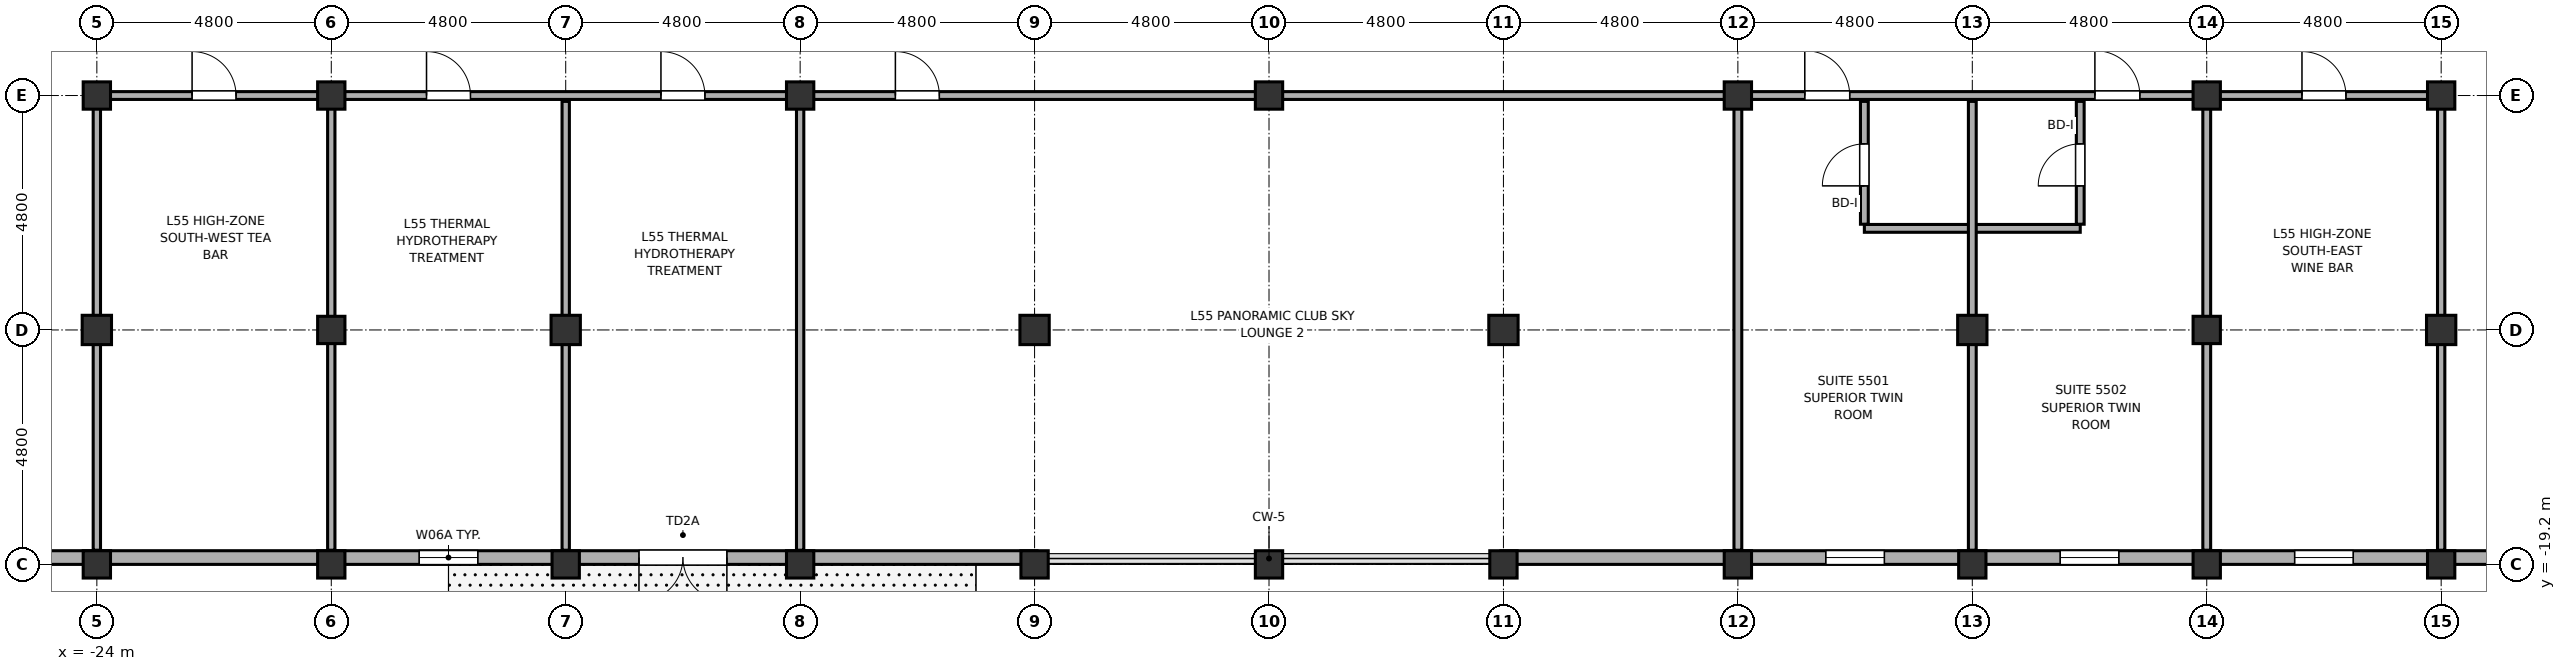
"""IFC4 building model, lengths in metres.
Left out: names, types, materials, properties, quantities, classifications, styles, units other than length and angle.
Written with IfcOpenShell. Run it as: python <this file> out.ifc"""

import sys

from ifc_helpers import new_model, si_unit, direction, frame, frame_2d, origin, origin_2d, place, context, subcontext, project, spatial, rectangle, hollow_rectangle, hollow_circle, extrude, element, fill, save


model = new_model("IFC4")
c1 = context("Model", 3, precision=1e-05, world=origin(), true_north=direction((0.0, 1.0)))
c2 = subcontext(c1, "Body", "Model", "MODEL_VIEW")
j1 = project(units=[si_unit("LENGTHUNIT", "METRE"), si_unit("PLANEANGLEUNIT", "RADIAN")], contexts=[c1])
p1 = place(None, origin())
s1 = spatial("IfcSite", under=j1, at=p1, CompositionType="ELEMENT")
p2 = place(p1, origin())
s2 = spatial("IfcBuilding", under=s1, at=p2, CompositionType="ELEMENT")
p3 = place(p2, frame((0.0, 0.0, 222.3)))
s3 = spatial("IfcBuildingStorey", under=s2, at=p3, CompositionType="ELEMENT", Elevation=222.3)
p4 = place(p3, frame((-24.0, -19.2, 0.0), z_axis=(0.0, 0.0, 1.0), x_axis=(1.0, 0.0, 0.0)))
e1 = element("IfcColumn", 1, at=p4, inside=s3, PredefinedType="COLUMN", context=c2, shape_type="SweptSolid", body=[
    extrude(hollow_circle(Radius=0.28, WallThickness=0.025, at=origin_2d()), origin(), (0.0, 0.0, 1.0), 3.85),
])
p5 = place(p3, frame((-24.0, -14.4, 0.0), z_axis=(0.0, 0.0, 1.0), x_axis=(1.0, 0.0, 0.0)))
e2 = element("IfcColumn", 2, at=p5, inside=s3, PredefinedType="COLUMN", context=c2, shape_type="SweptSolid", body=[
    extrude(hollow_rectangle(XDim=0.6, YDim=0.6, WallThickness=0.028, at=origin_2d()), origin(), (0.0, 0.0, 1.0), 3.85),
])
for number, where, z_axis, x_axis in (
    (3, (-24.0, -9.6, 0.0), (0.0, 0.0, 1.0), (1.0, 0.0, 0.0)),
    (4, (-19.2, -19.2, 0.0), (0.0, 0.0, 1.0), (1.0, 0.0, 0.0)),
    (5, (-19.2, -14.4, 0.0), (0.0, 0.0, 1.0), (1.0, 0.0, 0.0)),
    (6, (-19.2, -9.6, 0.0), (0.0, 0.0, 1.0), (1.0, 0.0, 0.0)),
    (7, (-14.4, -19.2, 0.0), (0.0, 0.0, 1.0), (1.0, 0.0, 0.0)),
):
    element("IfcColumn", number, at=place(p3, frame(where, z_axis=z_axis, x_axis=x_axis)), inside=s3, PredefinedType="COLUMN", context=c2, shape_type="SweptSolid", body=[
        extrude(hollow_circle(Radius=0.28, WallThickness=0.025, at=origin_2d()), origin(), (0.0, 0.0, 1.0), 3.85),
    ])
p6 = place(p3, frame((-14.4, -14.4, 0.0), z_axis=(0.0, 0.0, 1.0), x_axis=(1.0, 0.0, 0.0)))
e8 = element("IfcColumn", 8, at=p6, inside=s3, PredefinedType="COLUMN", context=c2, shape_type="SweptSolid", body=[
    extrude(hollow_rectangle(XDim=0.6, YDim=0.6, WallThickness=0.028, at=origin_2d()), origin(), (0.0, 0.0, 1.0), 3.85),
])
for number, where, z_axis, x_axis in (
    (9, (-9.6, -19.2, 0.0), (0.0, 0.0, 1.0), (1.0, 0.0, 0.0)),
    (10, (-9.6, -9.6, 0.0), (0.0, 0.0, 1.0), (1.0, 0.0, 0.0)),
    (11, (-4.8, -19.2, 0.0), (0.0, 0.0, 1.0), (1.0, 0.0, 0.0)),
):
    element("IfcColumn", number, at=place(p3, frame(where, z_axis=z_axis, x_axis=x_axis)), inside=s3, PredefinedType="COLUMN", context=c2, shape_type="SweptSolid", body=[
        extrude(hollow_circle(Radius=0.28, WallThickness=0.025, at=origin_2d()), origin(), (0.0, 0.0, 1.0), 3.85),
    ])
p7 = place(p3, frame((-4.8, -14.4, 0.0), z_axis=(0.0, 0.0, 1.0), x_axis=(1.0, 0.0, 0.0)))
e12 = element("IfcColumn", 12, at=p7, inside=s3, PredefinedType="COLUMN", context=c2, shape_type="SweptSolid", body=[
    extrude(hollow_rectangle(XDim=0.6, YDim=0.6, WallThickness=0.028, at=origin_2d()), origin(), (0.0, 0.0, 1.0), 3.85),
])
for number, where, z_axis, x_axis in (
    (13, (0.0, -19.2, 0.0), (0.0, 0.0, 1.0), (1.0, 0.0, 0.0)),
    (14, (0.0, -9.6, 0.0), (0.0, 0.0, 1.0), (1.0, 0.0, 0.0)),
    (15, (4.8, -19.2, 0.0), (0.0, 0.0, 1.0), (1.0, 0.0, 0.0)),
):
    element("IfcColumn", number, at=place(p3, frame(where, z_axis=z_axis, x_axis=x_axis)), inside=s3, PredefinedType="COLUMN", context=c2, shape_type="SweptSolid", body=[
        extrude(hollow_circle(Radius=0.28, WallThickness=0.025, at=origin_2d()), origin(), (0.0, 0.0, 1.0), 3.85),
    ])
p8 = place(p3, frame((4.8, -14.4, 0.0), z_axis=(0.0, 0.0, 1.0), x_axis=(1.0, 0.0, 0.0)))
e16 = element("IfcColumn", 16, at=p8, inside=s3, PredefinedType="COLUMN", context=c2, shape_type="SweptSolid", body=[
    extrude(hollow_rectangle(XDim=0.6, YDim=0.6, WallThickness=0.028, at=origin_2d()), origin(), (0.0, 0.0, 1.0), 3.85),
])
for number, where, z_axis, x_axis in (
    (17, (9.6, -19.2, 0.0), (0.0, 0.0, 1.0), (1.0, 0.0, 0.0)),
    (18, (9.6, -9.6, 0.0), (0.0, 0.0, 1.0), (1.0, 0.0, 0.0)),
    (19, (14.4, -19.2, 0.0), (0.0, 0.0, 1.0), (1.0, 0.0, 0.0)),
):
    element("IfcColumn", number, at=place(p3, frame(where, z_axis=z_axis, x_axis=x_axis)), inside=s3, PredefinedType="COLUMN", context=c2, shape_type="SweptSolid", body=[
        extrude(hollow_circle(Radius=0.28, WallThickness=0.025, at=origin_2d()), origin(), (0.0, 0.0, 1.0), 3.85),
    ])
p9 = place(p3, frame((14.4, -14.4, 0.0), z_axis=(0.0, 0.0, 1.0), x_axis=(1.0, 0.0, 0.0)))
e20 = element("IfcColumn", 20, at=p9, inside=s3, PredefinedType="COLUMN", context=c2, shape_type="SweptSolid", body=[
    extrude(hollow_rectangle(XDim=0.6, YDim=0.6, WallThickness=0.028, at=origin_2d()), origin(), (0.0, 0.0, 1.0), 3.85),
])
for number, where, z_axis, x_axis in (
    (21, (19.2, -19.2, 0.0), (0.0, 0.0, 1.0), (1.0, 0.0, 0.0)),
    (22, (19.2, -14.4, 0.0), (0.0, 0.0, 1.0), (1.0, 0.0, 0.0)),
    (23, (19.2, -9.6, 0.0), (0.0, 0.0, 1.0), (1.0, 0.0, 0.0)),
    (24, (24.0, -19.2, 0.0), (0.0, 0.0, 1.0), (1.0, 0.0, 0.0)),
):
    element("IfcColumn", number, at=place(p3, frame(where, z_axis=z_axis, x_axis=x_axis)), inside=s3, PredefinedType="COLUMN", context=c2, shape_type="SweptSolid", body=[
        extrude(hollow_circle(Radius=0.28, WallThickness=0.025, at=origin_2d()), origin(), (0.0, 0.0, 1.0), 3.85),
    ])
p10 = place(p3, frame((24.0, -14.4, 0.0), z_axis=(0.0, 0.0, 1.0), x_axis=(1.0, 0.0, 0.0)))
e25 = element("IfcColumn", 25, at=p10, inside=s3, PredefinedType="COLUMN", context=c2, shape_type="SweptSolid", body=[
    extrude(hollow_rectangle(XDim=0.6, YDim=0.6, WallThickness=0.028, at=origin_2d()), origin(), (0.0, 0.0, 1.0), 3.85),
])
p11 = place(p3, frame((24.0, -9.6, 0.0), z_axis=(0.0, 0.0, 1.0), x_axis=(1.0, 0.0, 0.0)))
e26 = element("IfcColumn", 26, at=p11, inside=s3, PredefinedType="COLUMN", context=c2, shape_type="SweptSolid", body=[
    extrude(hollow_circle(Radius=0.28, WallThickness=0.025, at=origin_2d()), origin(), (0.0, 0.0, 1.0), 3.85),
])
p12 = place(p3, frame((-25.2, -19.06, 0.0), z_axis=(0.0, 0.0, 1.0), x_axis=(1.0, 0.0, 0.0)))
e27 = element("IfcWall", 27, at=p12, inside=s3, PredefinedType="SOLIDWALL", context=c2, shape_type="SweptSolid", body=[
    extrude(rectangle(XDim=20.45, YDim=0.28, at=frame_2d((10.225, 0.0))), origin(), (0.0, 0.0, 1.0), 2.27),
])
p13 = place(p12, frame((12.3, 0.0, 0.0)))
e28 = element("IfcOpeningElement", 28, at=p13, cuts=e27, PredefinedType="OPENING", context=c2, shape_type="SweptSolid", body=[
    extrude(rectangle(XDim=1.8, YDim=2.02, at=frame_2d((0.9, 1.01))), frame((0.0, 0.155, 0.0), z_axis=(0.0, -1.0, 0.0), x_axis=(1.0, 0.0, 0.0)), (0.0, 0.0, 1.0), 0.31),
])
p14 = place(p12, frame((7.8, 0.0, 0.75)))
e29 = element("IfcOpeningElement", 29, at=p14, cuts=e27, PredefinedType="OPENING", context=c2, shape_type="SweptSolid", body=[
    extrude(rectangle(XDim=1.2, YDim=1.15, at=frame_2d((0.6, 0.575))), frame((0.0, 0.155, 0.0), z_axis=(0.0, -1.0, 0.0), x_axis=(1.0, 0.0, 0.0)), (0.0, 0.0, 1.0), 0.31),
])
p15 = place(p3, frame((4.75, -19.06, 0.0), z_axis=(0.0, 0.0, 1.0), x_axis=(1.0, 0.0, 0.0)))
e30 = element("IfcWall", 30, at=p15, inside=s3, PredefinedType="SOLIDWALL", context=c2, shape_type="SweptSolid", body=[
    extrude(rectangle(XDim=25.25, YDim=0.28, at=frame_2d((12.625, 0.0))), origin(), (0.0, 0.0, 1.0), 2.27),
])
p16 = place(p15, frame((16.25, 0.0, 0.75)))
e31 = element("IfcOpeningElement", 31, at=p16, cuts=e30, PredefinedType="OPENING", context=c2, shape_type="SweptSolid", body=[
    extrude(rectangle(XDim=1.2, YDim=1.15, at=frame_2d((0.6, 0.575))), frame((0.0, 0.155, 0.0), z_axis=(0.0, -1.0, 0.0), x_axis=(1.0, 0.0, 0.0)), (0.0, 0.0, 1.0), 0.31),
])
p17 = place(p15, frame((6.65, 0.0, 0.75)))
e32 = element("IfcOpeningElement", 32, at=p17, cuts=e30, PredefinedType="OPENING", context=c2, shape_type="SweptSolid", body=[
    extrude(rectangle(XDim=1.2, YDim=1.15, at=frame_2d((0.6, 0.575))), frame((0.0, 0.155, 0.0), z_axis=(0.0, -1.0, 0.0), x_axis=(1.0, 0.0, 0.0)), (0.0, 0.0, 1.0), 0.31),
])
p18 = place(p15, frame((11.45, 0.0, 0.75)))
e33 = element("IfcOpeningElement", 33, at=p18, cuts=e30, PredefinedType="OPENING", context=c2, shape_type="SweptSolid", body=[
    extrude(rectangle(XDim=1.2, YDim=1.15, at=frame_2d((0.6, 0.575))), frame((0.0, 0.155, 0.0), z_axis=(0.0, -1.0, 0.0), x_axis=(1.0, 0.0, 0.0)), (0.0, 0.0, 1.0), 0.31),
])
p19 = place(p3, frame((12.19, -12.32, 0.0), z_axis=(0.0, 0.0, 1.0), x_axis=(1.0, 0.0, 0.0)))
e34 = element("IfcWall", 34, at=p19, inside=s3, PredefinedType="PARTITIONING", context=c2, shape_type="SweptSolid", body=[
    extrude(rectangle(XDim=4.42, YDim=0.16, at=frame_2d((2.21, 0.0))), origin(), (0.0, 0.0, 1.0), 3.12),
])
p20 = place(p3, frame((-23.92, -9.6, 0.0), z_axis=(0.0, 0.0, 1.0), x_axis=(1.0, 0.0, 0.0)))
e35 = element("IfcWall", 35, at=p20, inside=s3, PredefinedType="PARTITIONING", context=c2, shape_type="SweptSolid", body=[
    extrude(rectangle(XDim=47.84, YDim=0.16, at=frame_2d((23.92, 0.0))), origin(), (0.0, 0.0, 1.0), 2.27),
])
p21 = place(p20, frame((1.87, 0.0, 0.0)))
e36 = element("IfcOpeningElement", 36, at=p21, cuts=e35, PredefinedType="OPENING", context=c2, shape_type="SweptSolid", body=[
    extrude(rectangle(XDim=0.9, YDim=2.1, at=frame_2d((0.45, 1.05))), frame((0.0, 0.095, 0.0), z_axis=(0.0, -1.0, 0.0), x_axis=(1.0, 0.0, 0.0)), (0.0, 0.0, 1.0), 0.19),
])
p22 = place(p20, frame((45.07, 0.0, 0.0)))
e37 = element("IfcOpeningElement", 37, at=p22, cuts=e35, PredefinedType="OPENING", context=c2, shape_type="SweptSolid", body=[
    extrude(rectangle(XDim=0.9, YDim=2.1, at=frame_2d((0.45, 1.05))), frame((0.0, 0.095, 0.0), z_axis=(0.0, -1.0, 0.0), x_axis=(1.0, 0.0, 0.0)), (0.0, 0.0, 1.0), 0.19),
])
p23 = place(p20, frame((6.67, 0.0, 0.0)))
e38 = element("IfcOpeningElement", 38, at=p23, cuts=e35, PredefinedType="OPENING", context=c2, shape_type="SweptSolid", body=[
    extrude(rectangle(XDim=0.9, YDim=2.1, at=frame_2d((0.45, 1.05))), frame((0.0, 0.095, 0.0), z_axis=(0.0, -1.0, 0.0), x_axis=(1.0, 0.0, 0.0)), (0.0, 0.0, 1.0), 0.19),
])
p24 = place(p20, frame((11.47, 0.0, 0.0)))
e39 = element("IfcOpeningElement", 39, at=p24, cuts=e35, PredefinedType="OPENING", context=c2, shape_type="SweptSolid", body=[
    extrude(rectangle(XDim=0.9, YDim=2.1, at=frame_2d((0.45, 1.05))), frame((0.0, 0.095, 0.0), z_axis=(0.0, -1.0, 0.0), x_axis=(1.0, 0.0, 0.0)), (0.0, 0.0, 1.0), 0.19),
])
p25 = place(p20, frame((16.27, 0.0, 0.0)))
e40 = element("IfcOpeningElement", 40, at=p25, cuts=e35, PredefinedType="OPENING", context=c2, shape_type="SweptSolid", body=[
    extrude(rectangle(XDim=0.9, YDim=2.1, at=frame_2d((0.45, 1.05))), frame((0.0, 0.095, 0.0), z_axis=(0.0, -1.0, 0.0), x_axis=(1.0, 0.0, 0.0)), (0.0, 0.0, 1.0), 0.19),
])
p26 = place(p20, frame((34.89, 0.0, 0.0)))
e41 = element("IfcOpeningElement", 41, at=p26, cuts=e35, PredefinedType="OPENING", context=c2, shape_type="SweptSolid", body=[
    extrude(rectangle(XDim=0.92, YDim=2.15, at=frame_2d((0.46, 1.075))), frame((0.0, 0.095, 0.0), z_axis=(0.0, -1.0, 0.0), x_axis=(1.0, 0.0, 0.0)), (0.0, 0.0, 1.0), 0.19),
])
p27 = place(p20, frame((40.83, 0.0, 0.0)))
e42 = element("IfcOpeningElement", 42, at=p27, cuts=e35, PredefinedType="OPENING", context=c2, shape_type="SweptSolid", body=[
    extrude(rectangle(XDim=0.92, YDim=2.15, at=frame_2d((0.46, 1.075))), frame((0.0, 0.095, 0.0), z_axis=(0.0, -1.0, 0.0), x_axis=(1.0, 0.0, 0.0)), (0.0, 0.0, 1.0), 0.19),
])
for number, where, z_axis, x_axis in (
    (43, (-24.0, -18.91, 0.0), (0.0, 0.0, 1.0), (0.0, 1.0, 0.0)),
    (44, (-19.2, -18.91, 0.0), (0.0, 0.0, 1.0), (0.0, 1.0, 0.0)),
    (45, (-14.4, -18.91, 0.0), (0.0, 0.0, 1.0), (0.0, 1.0, 0.0)),
    (46, (-9.6, -18.91, 0.0), (0.0, 0.0, 1.0), (0.0, 1.0, 0.0)),
):
    element("IfcWall", number, at=place(p3, frame(where, z_axis=z_axis, x_axis=x_axis)), inside=s3, PredefinedType="PARTITIONING", context=c2, shape_type="SweptSolid", body=[
        extrude(rectangle(XDim=9.19, YDim=0.15, at=frame_2d((4.595, 0.0))), origin(), (0.0, 0.0, 1.0), 2.27),
    ])
p28 = place(p3, frame((9.6, -18.91, 0.0), z_axis=(0.0, 0.0, 1.0), x_axis=(0.0, 1.0, 0.0)))
e47 = element("IfcWall", 47, at=p28, inside=s3, PredefinedType="PARTITIONING", context=c2, shape_type="SweptSolid", body=[
    extrude(rectangle(XDim=9.19, YDim=0.16, at=frame_2d((4.595, 0.0))), origin(), (0.0, 0.0, 1.0), 2.27),
])
p29 = place(p3, frame((12.19, -12.235, 0.0), z_axis=(0.0, 0.0, 1.0), x_axis=(0.0, 1.0, 0.0)))
e48 = element("IfcWall", 48, at=p29, inside=s3, PredefinedType="PARTITIONING", context=c2, shape_type="SweptSolid", body=[
    extrude(rectangle(XDim=2.515, YDim=0.16, at=frame_2d((1.258, 0.0))), origin(), (0.0, 0.0, 1.0), 2.27),
])
p30 = place(p29, frame((0.785, 0.0, 0.0)))
e49 = element("IfcOpeningElement", 49, at=p30, cuts=e48, PredefinedType="OPENING", context=c2, shape_type="SweptSolid", body=[
    extrude(rectangle(XDim=0.86, YDim=2.1, at=frame_2d((0.43, 1.05))), frame((0.0, 0.095, 0.0), z_axis=(0.0, -1.0, 0.0), x_axis=(1.0, 0.0, 0.0)), (0.0, 0.0, 1.0), 0.19),
])
p31 = place(p3, frame((14.4, -18.91, 0.0), z_axis=(0.0, 0.0, 1.0), x_axis=(0.0, 1.0, 0.0)))
e50 = element("IfcWall", 50, at=p31, inside=s3, PredefinedType="PARTITIONING", context=c2, shape_type="SweptSolid", body=[
    extrude(rectangle(XDim=9.19, YDim=0.16, at=frame_2d((4.595, 0.0))), origin(), (0.0, 0.0, 1.0), 2.27),
])
p32 = place(p3, frame((16.61, -12.235, 0.0), z_axis=(0.0, 0.0, 1.0), x_axis=(0.0, 1.0, 0.0)))
e51 = element("IfcWall", 51, at=p32, inside=s3, PredefinedType="PARTITIONING", context=c2, shape_type="SweptSolid", body=[
    extrude(rectangle(XDim=2.515, YDim=0.16, at=frame_2d((1.258, 0.0))), origin(), (0.0, 0.0, 1.0), 2.27),
])
p33 = place(p32, frame((0.785, 0.0, 0.0)))
e52 = element("IfcOpeningElement", 52, at=p33, cuts=e51, PredefinedType="OPENING", context=c2, shape_type="SweptSolid", body=[
    extrude(rectangle(XDim=0.86, YDim=2.1, at=frame_2d((0.43, 1.05))), frame((0.0, 0.095, 0.0), z_axis=(0.0, -1.0, 0.0), x_axis=(1.0, 0.0, 0.0)), (0.0, 0.0, 1.0), 0.19),
])
p34 = place(p3, frame((19.2, -18.91, 0.0), z_axis=(0.0, 0.0, 1.0), x_axis=(0.0, 1.0, 0.0)))
e53 = element("IfcWall", 53, at=p34, inside=s3, PredefinedType="PARTITIONING", context=c2, shape_type="SweptSolid", body=[
    extrude(rectangle(XDim=9.19, YDim=0.16, at=frame_2d((4.595, 0.0))), origin(), (0.0, 0.0, 1.0), 2.27),
])
p35 = place(p3, frame((24.0, -18.91, 0.0), z_axis=(0.0, 0.0, 1.0), x_axis=(0.0, 1.0, 0.0)))
e54 = element("IfcWall", 54, at=p35, inside=s3, PredefinedType="PARTITIONING", context=c2, shape_type="SweptSolid", body=[
    extrude(rectangle(XDim=9.19, YDim=0.15, at=frame_2d((4.595, 0.0))), origin(), (0.0, 0.0, 1.0), 2.27),
])
p36 = place(p13, origin())
e55 = element("IfcDoor", 55, at=p36, inside=s3, OperationType="DOUBLE_DOOR_SINGLE_SWING", PredefinedType="DOOR", context=c2, shape_type="SweptSolid", body=[
    extrude(rectangle(XDim=1.8, YDim=2.02, at=frame_2d((0.9, 1.01))), frame((0.0, 0.025, 0.0), z_axis=(0.0, -1.0, 0.0), x_axis=(1.0, 0.0, 0.0)), (0.0, 0.0, 1.0), 0.05),
])
fill(e28, e55)
p37 = place(p16, origin())
e56 = element("IfcWindow", 56, at=p37, inside=s3, PartitioningType="SINGLE_PANEL", PredefinedType="WINDOW", context=c2, shape_type="SweptSolid", body=[
    extrude(rectangle(XDim=1.2, YDim=1.15, at=frame_2d((0.6, 0.575))), frame((0.0, 0.03, 0.0), z_axis=(0.0, -1.0, 0.0), x_axis=(1.0, 0.0, 0.0)), (0.0, 0.0, 1.0), 0.06),
])
fill(e31, e56)
p38 = place(p14, origin())
e57 = element("IfcWindow", 57, at=p38, inside=s3, PartitioningType="SINGLE_PANEL", PredefinedType="WINDOW", context=c2, shape_type="SweptSolid", body=[
    extrude(rectangle(XDim=1.2, YDim=1.15, at=frame_2d((0.6, 0.575))), frame((0.0, 0.03, 0.0), z_axis=(0.0, -1.0, 0.0), x_axis=(1.0, 0.0, 0.0)), (0.0, 0.0, 1.0), 0.06),
])
fill(e29, e57)
p39 = place(p17, origin())
e58 = element("IfcWindow", 58, at=p39, inside=s3, PartitioningType="SINGLE_PANEL", PredefinedType="WINDOW", context=c2, shape_type="SweptSolid", body=[
    extrude(rectangle(XDim=1.2, YDim=1.15, at=frame_2d((0.6, 0.575))), frame((0.0, 0.03, 0.0), z_axis=(0.0, -1.0, 0.0), x_axis=(1.0, 0.0, 0.0)), (0.0, 0.0, 1.0), 0.06),
])
fill(e32, e58)
p40 = place(p18, origin())
e59 = element("IfcWindow", 59, at=p40, inside=s3, PartitioningType="SINGLE_PANEL", PredefinedType="WINDOW", context=c2, shape_type="SweptSolid", body=[
    extrude(rectangle(XDim=1.2, YDim=1.15, at=frame_2d((0.6, 0.575))), frame((0.0, 0.03, 0.0), z_axis=(0.0, -1.0, 0.0), x_axis=(1.0, 0.0, 0.0)), (0.0, 0.0, 1.0), 0.06),
])
fill(e33, e59)
p41 = place(p21, origin())
e60 = element("IfcDoor", 60, at=p41, inside=s3, OperationType="SINGLE_SWING_LEFT", PredefinedType="DOOR", context=c2, shape_type="SweptSolid", body=[
    extrude(rectangle(XDim=0.9, YDim=2.1, at=frame_2d((0.45, 1.05))), frame((0.0, 0.025, 0.0), z_axis=(0.0, -1.0, 0.0), x_axis=(1.0, 0.0, 0.0)), (0.0, 0.0, 1.0), 0.05),
])
fill(e36, e60)
p42 = place(p22, origin())
e61 = element("IfcDoor", 61, at=p42, inside=s3, OperationType="SINGLE_SWING_RIGHT", PredefinedType="DOOR", context=c2, shape_type="SweptSolid", body=[
    extrude(rectangle(XDim=0.9, YDim=2.1, at=frame_2d((0.45, 1.05))), frame((0.0, 0.025, 0.0), z_axis=(0.0, -1.0, 0.0), x_axis=(1.0, 0.0, 0.0)), (0.0, 0.0, 1.0), 0.05),
])
fill(e37, e61)
p43 = place(p23, origin())
e62 = element("IfcDoor", 62, at=p43, inside=s3, OperationType="SINGLE_SWING_LEFT", PredefinedType="DOOR", context=c2, shape_type="SweptSolid", body=[
    extrude(rectangle(XDim=0.9, YDim=2.1, at=frame_2d((0.45, 1.05))), frame((0.0, 0.025, 0.0), z_axis=(0.0, -1.0, 0.0), x_axis=(1.0, 0.0, 0.0)), (0.0, 0.0, 1.0), 0.05),
])
fill(e38, e62)
p44 = place(p24, origin())
e63 = element("IfcDoor", 63, at=p44, inside=s3, OperationType="SINGLE_SWING_LEFT", PredefinedType="DOOR", context=c2, shape_type="SweptSolid", body=[
    extrude(rectangle(XDim=0.9, YDim=2.1, at=frame_2d((0.45, 1.05))), frame((0.0, 0.025, 0.0), z_axis=(0.0, -1.0, 0.0), x_axis=(1.0, 0.0, 0.0)), (0.0, 0.0, 1.0), 0.05),
])
fill(e39, e63)
p45 = place(p25, origin())
e64 = element("IfcDoor", 64, at=p45, inside=s3, OperationType="SINGLE_SWING_RIGHT", PredefinedType="DOOR", context=c2, shape_type="SweptSolid", body=[
    extrude(rectangle(XDim=0.9, YDim=2.1, at=frame_2d((0.45, 1.05))), frame((0.0, 0.025, 0.0), z_axis=(0.0, -1.0, 0.0), x_axis=(1.0, 0.0, 0.0)), (0.0, 0.0, 1.0), 0.05),
])
fill(e40, e64)
p46 = place(p26, origin())
e65 = element("IfcDoor", 65, at=p46, inside=s3, OperationType="SINGLE_SWING_RIGHT", PredefinedType="DOOR", context=c2, shape_type="SweptSolid", body=[
    extrude(rectangle(XDim=0.92, YDim=2.15, at=frame_2d((0.46, 1.075))), frame((0.0, 0.025, 0.0), z_axis=(0.0, -1.0, 0.0), x_axis=(1.0, 0.0, 0.0)), (0.0, 0.0, 1.0), 0.05),
])
fill(e41, e65)
p47 = place(p30, origin())
e66 = element("IfcDoor", 66, at=p47, inside=s3, OperationType="SINGLE_SWING_RIGHT", PredefinedType="DOOR", context=c2, shape_type="SweptSolid", body=[
    extrude(rectangle(XDim=0.86, YDim=2.1, at=frame_2d((0.43, 1.05))), frame((0.0, 0.025, 0.0), z_axis=(0.0, -1.0, 0.0), x_axis=(1.0, 0.0, 0.0)), (0.0, 0.0, 1.0), 0.05),
])
fill(e49, e66)
p48 = place(p27, origin())
e67 = element("IfcDoor", 67, at=p48, inside=s3, OperationType="SINGLE_SWING_RIGHT", PredefinedType="DOOR", context=c2, shape_type="SweptSolid", body=[
    extrude(rectangle(XDim=0.92, YDim=2.15, at=frame_2d((0.46, 1.075))), frame((0.0, 0.025, 0.0), z_axis=(0.0, -1.0, 0.0), x_axis=(1.0, 0.0, 0.0)), (0.0, 0.0, 1.0), 0.05),
])
fill(e42, e67)
p49 = place(p33, origin())
e68 = element("IfcDoor", 68, at=p49, inside=s3, OperationType="SINGLE_SWING_LEFT", PredefinedType="DOOR", context=c2, shape_type="SweptSolid", body=[
    extrude(rectangle(XDim=0.86, YDim=2.1, at=frame_2d((0.43, 1.05))), frame((0.0, 0.025, 0.0), z_axis=(0.0, -1.0, 0.0), x_axis=(1.0, 0.0, 0.0)), (0.0, 0.0, 1.0), 0.05),
])
fill(e52, e68)
save(model, sys.argv[1])
